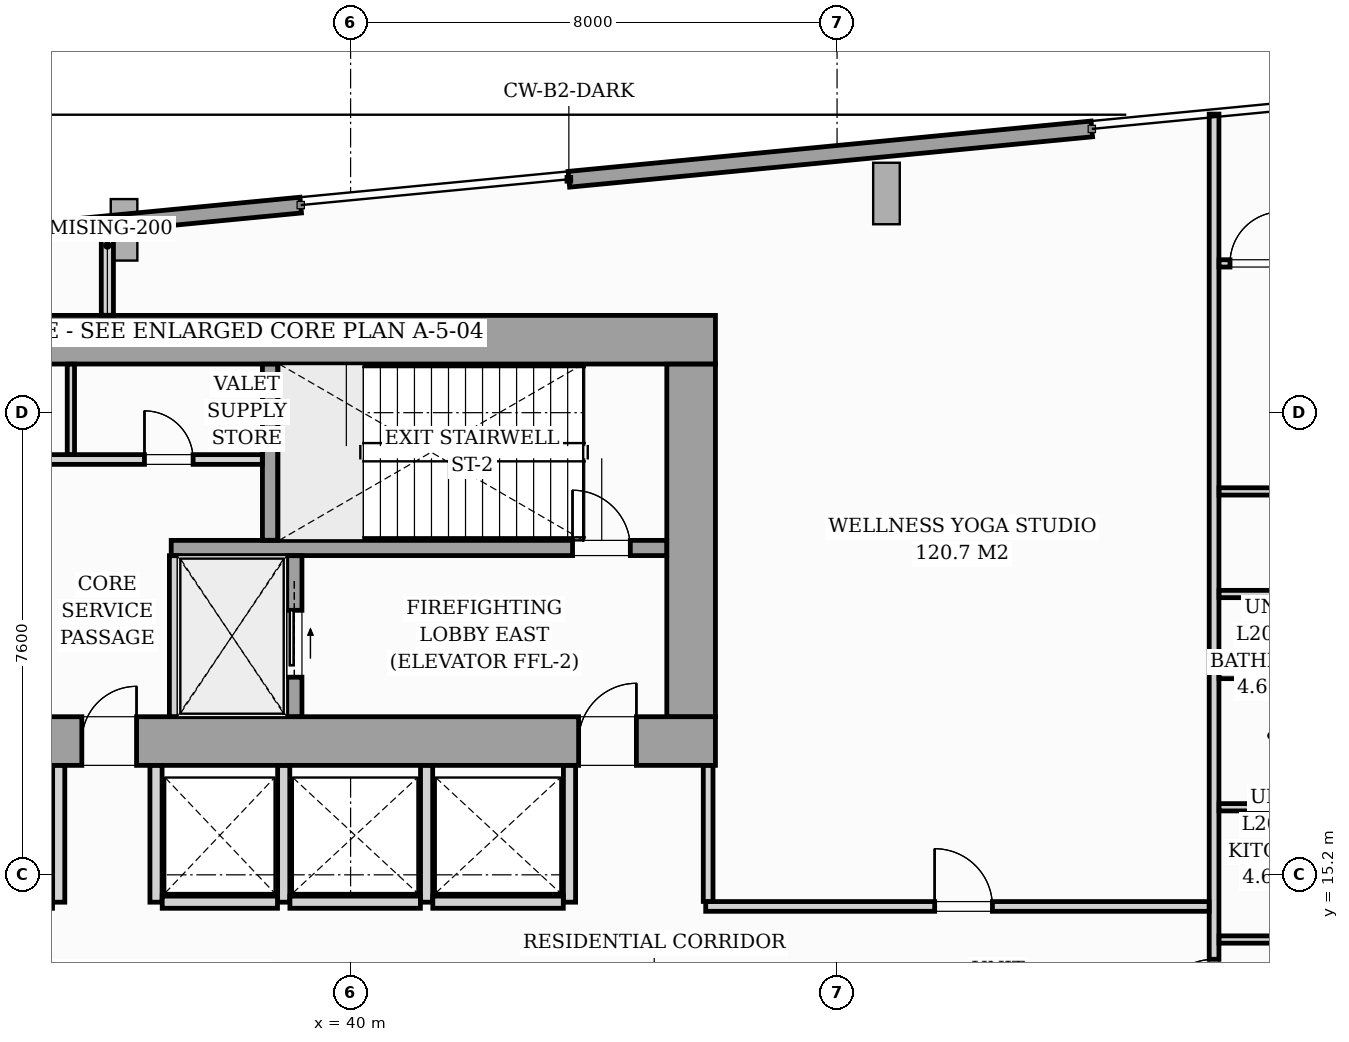
"""IFC4 building model, lengths in metres.
Left out: names, types, materials, properties, quantities, classifications, styles, units other than length and angle.
Written with IfcOpenShell. Run it as: python <this file> out.ifc"""

import sys

from ifc_helpers import new_model, si_unit, direction, frame, frame_2d, origin, origin_2d, place, context, subcontext, project, spatial, rectangle, i_section, extrude, source, transform, mapped, element, fill, save


model = new_model("IFC4")
c1 = context("Model", 3, precision=1e-05, world=origin(), true_north=direction((0.0, 1.0)))
c2 = subcontext(c1, "Body", "Model", "MODEL_VIEW")
j1 = project(units=[si_unit("LENGTHUNIT", "METRE"), si_unit("PLANEANGLEUNIT", "RADIAN")], contexts=[c1])
p1 = place(None, origin())
s1 = spatial("IfcSite", under=j1, at=p1, CompositionType="ELEMENT")
p2 = place(p1, origin())
s2 = spatial("IfcBuilding", under=s1, at=p2, CompositionType="ELEMENT")
p3 = place(p2, frame((0.0, 0.0, 72.6)))
s3 = spatial("IfcBuildingStorey", under=s2, at=p3, CompositionType="ELEMENT", Elevation=72.6)
m1 = source(origin(), c2, "Body", "SweptSolid", [
    extrude(i_section(OverallWidth=0.427, OverallDepth=0.483, WebThickness=0.051, FlangeThickness=0.082, FilletRadius=0.018, at=origin_2d()), origin(), (0.0, 0.0, 1.0), 5.196),
])
for number, where, z_axis, x_axis in (
    (1, (38.88, 17.4, 0.002), (0.0, 0.0, 1.0), (1.0, 0.0, 0.0)),
    (2, (45.6, 17.4, 0.002), (0.0, 0.0, 1.0), (1.0, 0.0, 0.0)),
    (3, (38.88, 24.0, 0.002), (0.0, 0.0, 1.0), (1.0, 0.0, 0.0)),
    (4, (45.6, 24.0, 0.002), (0.0, 0.0, 1.0), (1.0, 0.0, 0.0)),
):
    element("IfcColumn", number, at=place(p3, frame(where, z_axis=z_axis, x_axis=x_axis)), inside=s3, PredefinedType="PILASTER", context=c2, shape_type="MappedRepresentation", body=[
        mapped(m1, transform((0.0, 0.0, 0.0), scale=1.0)),
    ])
m2 = source(origin(), c2, "Body", "SweptSolid", [
    extrude(i_section(OverallWidth=0.438, OverallDepth=1.011, WebThickness=0.041, FlangeThickness=0.074, FilletRadius=0.024, at=origin_2d()), origin(), (0.0, 0.0, 1.0), 5.27),
])
p4 = place(p3, frame((35.649, 25.935, 0.124), z_axis=(0.499720902571, -0.102566244395, 0.860092544465), x_axis=(-0.84252926259, 0.172926651282, 0.510138035198)))
e5 = element("IfcColumn", 5, at=p4, inside=s3, PredefinedType="COLUMN", context=c2, shape_type="MappedRepresentation", body=[
    mapped(m2, transform((0.0, 0.0, 0.0), scale=1.0)),
])
m3 = source(origin(), c2, "Body", "SweptSolid", [
    extrude(i_section(OverallWidth=0.438, OverallDepth=1.011, WebThickness=0.041, FlangeThickness=0.074, FilletRadius=0.024, at=origin_2d()), origin(), (0.0, 0.0, 1.0), 5.549),
])
p5 = place(p3, frame((48.048, 26.425, 0.14), z_axis=(0.584868790237, -0.015707376673, 0.810975817472), x_axis=(-0.810683514332, 0.021771911127, 0.585079672759)))
e6 = element("IfcColumn", 6, at=p5, inside=s3, PredefinedType="COLUMN", context=c2, shape_type="MappedRepresentation", body=[
    mapped(m3, transform((0.0, 0.0, 0.0), scale=1.0)),
])
p6 = place(p3, frame((31.993, 25.522, 0.0), z_axis=(0.0, 0.0, 1.0), x_axis=(0.99539768453, 0.095830316879, 0.0)))
e7 = element("IfcWall", 7, at=p6, inside=s3, PredefinedType="STANDARD", context=c2, shape_type="SweptSolid", body=[
    extrude(rectangle(XDim=7.22, YDim=0.26, at=frame_2d((3.61, 0.0))), origin(), (0.0, 0.0, 1.0), 4.78),
])
p7 = place(p3, frame((43.589, 26.638, 0.0), z_axis=(0.0, 0.0, 1.0), x_axis=(0.995396129087, 0.09584647202, 0.0)))
e8 = element("IfcWall", 8, at=p7, inside=s3, PredefinedType="STANDARD", context=c2, shape_type="SweptSolid", body=[
    extrude(rectangle(XDim=8.64, YDim=0.26, at=frame_2d((4.32, 0.0))), origin(), (0.0, 0.0, 1.0), 4.78),
])
p8 = place(p3, frame((26.0, 17.4, 0.0), z_axis=(0.0, 0.0, 1.0), x_axis=(1.0, 0.0, 0.0)))
e9 = element("IfcWall", 9, at=p8, inside=s3, PredefinedType="SHEAR", context=c2, shape_type="SweptSolid", body=[
    extrude(rectangle(XDim=20.0, YDim=0.8, at=frame_2d((10.0, 0.0))), origin(), (0.0, 0.0, 1.0), 5.2),
])
p9 = place(p8, frame((1.15, 0.0, 0.0)))
e10 = element("IfcOpeningElement", 10, at=p9, cuts=e9, PredefinedType="OPENING", context=c2, shape_type="SweptSolid", body=[
    extrude(rectangle(XDim=0.95, YDim=2.06, at=frame_2d((0.475, 1.03))), frame((0.0, 0.41, 0.0), z_axis=(0.0, -1.0, 0.0), x_axis=(1.0, 0.0, 0.0)), (0.0, 0.0, 1.0), 0.82),
])
p10 = place(p8, frame((9.58, 0.0, 0.0)))
e11 = element("IfcOpeningElement", 11, at=p10, cuts=e9, PredefinedType="OPENING", context=c2, shape_type="SweptSolid", body=[
    extrude(rectangle(XDim=0.9, YDim=2.06, at=frame_2d((0.45, 1.03))), frame((0.0, 0.41, 0.0), z_axis=(0.0, -1.0, 0.0), x_axis=(1.0, 0.0, 0.0)), (0.0, 0.0, 1.0), 0.82),
])
p11 = place(p8, frame((17.75, 0.0, 0.0)))
e12 = element("IfcOpeningElement", 12, at=p11, cuts=e9, PredefinedType="OPENING", context=c2, shape_type="SweptSolid", body=[
    extrude(rectangle(XDim=0.95, YDim=2.06, at=frame_2d((0.475, 1.03))), frame((0.0, 0.41, 0.0), z_axis=(0.0, -1.0, 0.0), x_axis=(1.0, 0.0, 0.0)), (0.0, 0.0, 1.0), 0.82),
])
p12 = place(p3, frame((26.0, 24.0, 0.0), z_axis=(0.0, 0.0, 1.0), x_axis=(1.0, 0.0, 0.0)))
e13 = element("IfcWall", 13, at=p12, inside=s3, PredefinedType="SHEAR", context=c2, shape_type="SweptSolid", body=[
    extrude(rectangle(XDim=20.0, YDim=0.8, at=frame_2d((10.0, 0.0))), origin(), (0.0, 0.0, 1.0), 5.2),
])
p13 = place(p3, frame((45.6, 17.802, 0.0), z_axis=(0.0, 0.0, 1.0), x_axis=(0.0, 1.0, 0.0)))
e14 = element("IfcWall", 14, at=p13, inside=s3, PredefinedType="SHEAR", context=c2, shape_type="SweptSolid", body=[
    extrude(rectangle(XDim=5.796, YDim=0.8, at=frame_2d((2.898, 0.0))), origin(), (0.0, 0.0, 1.0), 5.2),
])
p14 = place(p3, frame((37.05, 20.575, 0.0), z_axis=(0.0, 0.0, 1.0), x_axis=(1.0, 0.0, 0.0)))
e15 = element("IfcWall", 15, at=p14, inside=s3, PredefinedType="SOLIDWALL", context=c2, shape_type="SweptSolid", body=[
    extrude(rectangle(XDim=8.148, YDim=0.25, at=frame_2d((4.074, 0.0))), origin(), (0.0, 0.0, 1.0), 5.2),
])
p15 = place(p14, frame((6.6, 0.0, 0.0)))
e16 = element("IfcOpeningElement", 16, at=p15, cuts=e15, PredefinedType="OPENING", context=c2, shape_type="SweptSolid", body=[
    extrude(rectangle(XDim=0.95, YDim=2.06, at=frame_2d((0.475, 1.03))), frame((0.0, 0.135, 0.0), z_axis=(0.0, -1.0, 0.0), x_axis=(1.0, 0.0, 0.0)), (0.0, 0.0, 1.0), 0.27),
])
p16 = place(p3, frame((38.675, 20.702, 0.0), z_axis=(0.0, 0.0, 1.0), x_axis=(0.0, 1.0, 0.0)))
e17 = element("IfcWall", 17, at=p16, inside=s3, PredefinedType="SOLIDWALL", context=c2, shape_type="SweptSolid", body=[
    extrude(rectangle(XDim=2.896, YDim=0.25, at=frame_2d((1.448, 0.0))), origin(), (0.0, 0.0, 1.0), 5.2),
])
p17 = place(p3, frame((37.1, 17.802, 0.0), z_axis=(0.0, 0.0, 1.0), x_axis=(0.0, 1.0, 0.0)))
e18 = element("IfcWall", 18, at=p17, inside=s3, PredefinedType="PARTITIONING", context=c2, shape_type="SweptSolid", body=[
    extrude(rectangle(XDim=2.646, YDim=0.16, at=frame_2d((1.323, 0.0))), origin(), (0.0, 0.0, 1.0), 4.78),
])
p18 = place(p3, frame((39.075, 17.802, 0.0), z_axis=(0.0, 0.0, 1.0), x_axis=(0.0, 1.0, 0.0)))
e19 = element("IfcWall", 19, at=p18, inside=s3, PredefinedType="SOLIDWALL", context=c2, shape_type="SweptSolid", body=[
    extrude(rectangle(XDim=2.646, YDim=0.25, at=frame_2d((1.323, 0.0))), origin(), (0.0, 0.0, 1.0), 5.2),
])
p19 = place(p18, frame((0.648, 0.0, 0.0)))
e20 = element("IfcOpeningElement", 20, at=p19, cuts=e19, PredefinedType="OPENING", context=c2, shape_type="SweptSolid", body=[
    extrude(rectangle(XDim=1.1, YDim=2.08, at=frame_2d((0.55, 1.04))), frame((0.0, 0.135, 0.0), z_axis=(0.0, -1.0, 0.0), x_axis=(1.0, 0.0, 0.0)), (0.0, 0.0, 1.0), 0.27),
])
p20 = place(p3, frame((33.452, 22.03, 0.0), z_axis=(0.0, 0.0, 1.0), x_axis=(1.0, 0.0, 0.0)))
e21 = element("IfcWall", 21, at=p20, inside=s3, PredefinedType="PARTITIONING", context=c2, shape_type="SweptSolid", body=[
    extrude(rectangle(XDim=5.096, YDim=0.16, at=frame_2d((2.548, 0.0))), origin(), (0.0, 0.0, 1.0), 4.78),
])
p21 = place(p20, frame((0.538, 0.0, 0.0)))
e22 = element("IfcOpeningElement", 22, at=p21, cuts=e21, PredefinedType="OPENING", context=c2, shape_type="SweptSolid", body=[
    extrude(rectangle(XDim=0.8, YDim=2.05, at=frame_2d((0.4, 1.025))), frame((0.0, 0.09, 0.0), z_axis=(0.0, -1.0, 0.0), x_axis=(1.0, 0.0, 0.0)), (0.0, 0.0, 1.0), 0.18),
])
p22 = place(p20, frame((3.158, 0.0, 0.0)))
e23 = element("IfcOpeningElement", 23, at=p22, cuts=e21, PredefinedType="OPENING", context=c2, shape_type="SweptSolid", body=[
    extrude(rectangle(XDim=0.8, YDim=2.05, at=frame_2d((0.4, 1.025))), frame((0.0, 0.09, 0.0), z_axis=(0.0, -1.0, 0.0), x_axis=(1.0, 0.0, 0.0)), (0.0, 0.0, 1.0), 0.18),
])
p23 = place(p3, frame((35.4, 22.112, 0.0), z_axis=(0.0, 0.0, 1.0), x_axis=(0.0, 1.0, 0.0)))
e24 = element("IfcWall", 24, at=p23, inside=s3, PredefinedType="PARTITIONING", context=c2, shape_type="SweptSolid", body=[
    extrude(rectangle(XDim=1.486, YDim=0.12, at=frame_2d((0.743, 0.0))), origin(), (0.0, 0.0, 1.0), 4.78),
])
for number, where, z_axis, x_axis in (
    (25, (35.2, 14.75, 0.0), (0.0, 0.0, 1.0), (0.0, 1.0, 0.0)),
    (26, (36.8, 14.75, 0.0), (0.0, 0.0, 1.0), (0.0, 1.0, 0.0)),
    (27, (38.9, 14.75, 0.0), (0.0, 0.0, 1.0), (0.0, 1.0, 0.0)),
):
    element("IfcWall", number, at=place(p3, frame(where, z_axis=z_axis, x_axis=x_axis)), inside=s3, PredefinedType="PARTITIONING", context=c2, shape_type="SweptSolid", body=[
        extrude(rectangle(XDim=2.248, YDim=0.2, at=frame_2d((1.124, 0.0))), origin(), (0.0, 0.0, 1.0), 4.78),
    ])
p24 = place(p3, frame((36.902, 14.75, 0.0), z_axis=(0.0, 0.0, 1.0), x_axis=(1.0, 0.0, 0.0)))
e28 = element("IfcWall", 28, at=p24, inside=s3, PredefinedType="PARTITIONING", context=c2, shape_type="SweptSolid", body=[
    extrude(rectangle(XDim=1.896, YDim=0.2, at=frame_2d((0.948, 0.0))), origin(), (0.0, 0.0, 1.0), 4.78),
])
for number, where, z_axis, x_axis in (
    (29, (41.25, 14.75, 0.0), (0.0, 0.0, 1.0), (0.0, 1.0, 0.0)),
    (30, (43.6, 14.75, 0.0), (0.0, 0.0, 1.0), (0.0, 1.0, 0.0)),
):
    element("IfcWall", number, at=place(p3, frame(where, z_axis=z_axis, x_axis=x_axis)), inside=s3, PredefinedType="PARTITIONING", context=c2, shape_type="SweptSolid", body=[
        extrude(rectangle(XDim=2.248, YDim=0.2, at=frame_2d((1.124, 0.0))), origin(), (0.0, 0.0, 1.0), 4.78),
    ])
for number, where, z_axis, x_axis in (
    (31, (39.002, 14.75, 0.0), (0.0, 0.0, 1.0), (1.0, 0.0, 0.0)),
    (32, (41.352, 14.75, 0.0), (0.0, 0.0, 1.0), (1.0, 0.0, 0.0)),
):
    element("IfcWall", number, at=place(p3, frame(where, z_axis=z_axis, x_axis=x_axis)), inside=s3, PredefinedType="PARTITIONING", context=c2, shape_type="SweptSolid", body=[
        extrude(rectangle(XDim=2.146, YDim=0.2, at=frame_2d((1.073, 0.0))), origin(), (0.0, 0.0, 1.0), 4.78),
    ])
p25 = place(p3, frame((54.2, 12.432, 0.0), z_axis=(0.0, 0.0, 1.0), x_axis=(0.0, 1.0, 0.0)))
e33 = element("IfcWall", 33, at=p25, inside=s3, PredefinedType="PARTITIONING", context=c2, shape_type="SweptSolid", body=[
    extrude(rectangle(XDim=15.278, YDim=0.16, at=frame_2d((7.639, 0.0))), origin(), (0.0, 0.0, 1.0), 4.78),
])
p26 = place(p25, frame((0.429, 0.0, 0.0)))
e34 = element("IfcOpeningElement", 34, at=p26, cuts=e33, PredefinedType="OPENING", context=c2, shape_type="SweptSolid", body=[
    extrude(rectangle(XDim=0.95, YDim=2.06, at=frame_2d((0.475, 1.03))), frame((0.0, 0.09, 0.0), z_axis=(0.0, -1.0, 0.0), x_axis=(1.0, 0.0, 0.0)), (0.0, 0.0, 1.0), 0.18),
])
p27 = place(p3, frame((36.0, 24.402, 0.0), z_axis=(0.0, 0.0, 1.0), x_axis=(0.0, 1.0, 0.0)))
e35 = element("IfcWall", 35, at=p27, inside=s3, PredefinedType="PARTITIONING", context=c2, shape_type="SweptSolid", body=[
    extrude(rectangle(XDim=1.373, YDim=0.2, at=frame_2d((0.687, 0.0))), origin(), (0.0, 0.0, 1.0), 4.78),
])
p28 = place(p3, frame((54.282, 16.311, 0.0), z_axis=(0.0, 0.0, 1.0), x_axis=(1.0, 0.0, 0.0)))
e36 = element("IfcWall", 36, at=p28, inside=s3, PredefinedType="PARTITIONING", context=c2, shape_type="SweptSolid", body=[
    extrude(rectangle(XDim=2.256, YDim=0.12, at=frame_2d((1.128, 0.0))), origin(), (0.0, 0.0, 1.0), 4.78),
])
p29 = place(p3, frame((54.282, 14.136, 0.0), z_axis=(0.0, 0.0, 1.0), x_axis=(1.0, 0.0, 0.0)))
e37 = element("IfcWall", 37, at=p29, inside=s3, PredefinedType="PARTITIONING", context=c2, shape_type="SweptSolid", body=[
    extrude(rectangle(XDim=2.256, YDim=0.12, at=frame_2d((1.128, 0.0))), origin(), (0.0, 0.0, 1.0), 4.78),
])
p30 = place(p29, frame((1.226, 0.0, 0.0)))
e38 = element("IfcOpeningElement", 38, at=p30, cuts=e37, PredefinedType="OPENING", context=c2, shape_type="SweptSolid", body=[
    extrude(rectangle(XDim=0.85, YDim=2.05, at=frame_2d((0.425, 1.025))), frame((0.0, 0.07, 0.0), z_axis=(0.0, -1.0, 0.0), x_axis=(1.0, 0.0, 0.0)), (0.0, 0.0, 1.0), 0.14),
])
p31 = place(p3, frame((54.282, 18.486, 0.0), z_axis=(0.0, 0.0, 1.0), x_axis=(1.0, 0.0, 0.0)))
e39 = element("IfcWall", 39, at=p31, inside=s3, PredefinedType="PARTITIONING", context=c2, shape_type="SweptSolid", body=[
    extrude(rectangle(XDim=2.256, YDim=0.12, at=frame_2d((1.128, 0.0))), origin(), (0.0, 0.0, 1.0), 4.78),
])
p32 = place(p3, frame((54.282, 25.255, 0.0), z_axis=(0.0, 0.0, 1.0), x_axis=(1.0, 0.0, 0.0)))
e40 = element("IfcWall", 40, at=p32, inside=s3, PredefinedType="PARTITIONING", context=c2, shape_type="SweptSolid", body=[
    extrude(rectangle(XDim=6.901, YDim=0.12, at=frame_2d((3.451, 0.0))), origin(), (0.0, 0.0, 1.0), 4.78),
])
p33 = place(p32, frame((0.18, 0.0, 0.0)))
e41 = element("IfcOpeningElement", 41, at=p33, cuts=e40, PredefinedType="OPENING", context=c2, shape_type="SweptSolid", body=[
    extrude(rectangle(XDim=0.85, YDim=2.05, at=frame_2d((0.425, 1.025))), frame((0.0, 0.07, 0.0), z_axis=(0.0, -1.0, 0.0), x_axis=(1.0, 0.0, 0.0)), (0.0, 0.0, 1.0), 0.14),
])
p34 = place(p3, frame((54.282, 21.505, 0.0), z_axis=(0.0, 0.0, 1.0), x_axis=(1.0, 0.0, 0.0)))
e42 = element("IfcWall", 42, at=p34, inside=s3, PredefinedType="PARTITIONING", context=c2, shape_type="SweptSolid", body=[
    extrude(rectangle(XDim=14.274, YDim=0.12, at=frame_2d((7.137, 0.0))), origin(), (0.0, 0.0, 1.0), 4.78),
])
p35 = place(p34, frame((4.853, 0.0, 0.0)))
e43 = element("IfcOpeningElement", 43, at=p35, cuts=e42, PredefinedType="OPENING", context=c2, shape_type="SweptSolid", body=[
    extrude(rectangle(XDim=0.85, YDim=2.05, at=frame_2d((0.425, 1.025))), frame((0.0, 0.07, 0.0), z_axis=(0.0, -1.0, 0.0), x_axis=(1.0, 0.0, 0.0)), (0.0, 0.0, 1.0), 0.14),
])
p36 = place(p3, frame((54.282, 19.818, 0.0), z_axis=(0.0, 0.0, 1.0), x_axis=(1.0, 0.0, 0.0)))
e44 = element("IfcWall", 44, at=p36, inside=s3, PredefinedType="PARTITIONING", context=c2, shape_type="SweptSolid", body=[
    extrude(rectangle(XDim=14.254, YDim=0.12, at=frame_2d((7.127, 0.0))), origin(), (0.0, 0.0, 1.0), 4.78),
])
p37 = place(p36, frame((4.853, 0.0, 0.0)))
e45 = element("IfcOpeningElement", 45, at=p37, cuts=e44, PredefinedType="OPENING", context=c2, shape_type="SweptSolid", body=[
    extrude(rectangle(XDim=0.85, YDim=2.05, at=frame_2d((0.425, 1.025))), frame((0.0, 0.07, 0.0), z_axis=(0.0, -1.0, 0.0), x_axis=(1.0, 0.0, 0.0)), (0.0, 0.0, 1.0), 0.14),
])
p38 = place(p3, frame((45.84, 14.68, 0.0), z_axis=(0.0, 0.0, 1.0), x_axis=(1.0, 0.0, 0.0)))
e46 = element("IfcWall", 46, at=p38, inside=s3, PredefinedType="PARTITIONING", context=c2, shape_type="SweptSolid", body=[
    extrude(rectangle(XDim=8.278, YDim=0.16, at=frame_2d((4.139, 0.0))), origin(), (0.0, 0.0, 1.0), 4.78),
])
p39 = place(p38, frame((3.765, 0.0, 0.0)))
e47 = element("IfcOpeningElement", 47, at=p39, cuts=e46, PredefinedType="OPENING", context=c2, shape_type="SweptSolid", body=[
    extrude(rectangle(XDim=0.95, YDim=2.06, at=frame_2d((0.475, 1.03))), frame((0.0, 0.09, 0.0), z_axis=(0.0, -1.0, 0.0), x_axis=(1.0, 0.0, 0.0)), (0.0, 0.0, 1.0), 0.18),
])
p40 = place(p3, frame((45.88, 14.762, 0.0), z_axis=(0.0, 0.0, 1.0), x_axis=(0.0, 1.0, 0.0)))
e48 = element("IfcWall", 48, at=p40, inside=s3, PredefinedType="PARTITIONING", context=c2, shape_type="SweptSolid", body=[
    extrude(rectangle(XDim=2.236, YDim=0.16, at=frame_2d((1.118, 0.0))), origin(), (0.0, 0.0, 1.0), 4.78),
])
m4 = source(origin(), c2, "Body", "SweptSolid", [
    extrude(rectangle(XDim=0.9, YDim=2.06, at=frame_2d((0.45, 1.03))), frame((0.0, 0.025, 0.0), z_axis=(0.0, -1.0, 0.0), x_axis=(1.0, 0.0, 0.0)), (0.0, 0.0, 1.0), 0.05),
])
p41 = place(p10, origin())
e49 = element("IfcDoor", 49, at=p41, inside=s3, OperationType="SINGLE_SWING_RIGHT", PredefinedType="DOOR", context=c2, shape_type="MappedRepresentation", body=[
    mapped(m4, transform((0.0, 0.0, 0.0), scale=1.0)),
])
fill(e11, e49)
m5 = source(origin(), c2, "Body", "SweptSolid", [
    extrude(rectangle(XDim=0.95, YDim=2.06, at=frame_2d((0.475, 1.03))), frame((0.0, 0.025, 0.0), z_axis=(0.0, -1.0, 0.0), x_axis=(1.0, 0.0, 0.0)), (0.0, 0.0, 1.0), 0.05),
])
p42 = place(p11, origin())
e50 = element("IfcDoor", 50, at=p42, inside=s3, OperationType="SINGLE_SWING_RIGHT", PredefinedType="DOOR", context=c2, shape_type="MappedRepresentation", body=[
    mapped(m5, transform((0.0, 0.0, 0.0), scale=1.0)),
])
fill(e12, e50)
p43 = place(p15, origin())
e51 = element("IfcDoor", 51, at=p43, inside=s3, OperationType="SINGLE_SWING_LEFT", PredefinedType="DOOR", context=c2, shape_type="MappedRepresentation", body=[
    mapped(m5, transform((0.0, 0.0, 0.0), scale=1.0)),
])
fill(e16, e51)
m6 = source(origin(), c2, "Body", "SweptSolid", [
    extrude(rectangle(XDim=1.1, YDim=2.08, at=frame_2d((0.55, 1.04))), frame((0.0, 0.025, 0.0), z_axis=(0.0, -1.0, 0.0), x_axis=(1.0, 0.0, 0.0)), (0.0, 0.0, 1.0), 0.05),
])
p44 = place(p19, origin())
e52 = element("IfcDoor", 52, at=p44, inside=s3, OperationType="SLIDING_TO_RIGHT", PredefinedType="DOOR", context=c2, shape_type="MappedRepresentation", body=[
    mapped(m6, transform((0.0, 0.0, 0.0), scale=1.0)),
])
fill(e20, e52)
m7 = source(origin(), c2, "Body", "SweptSolid", [
    extrude(rectangle(XDim=0.8, YDim=2.05, at=frame_2d((0.4, 1.025))), frame((0.0, 0.025, 0.0), z_axis=(0.0, -1.0, 0.0), x_axis=(1.0, 0.0, 0.0)), (0.0, 0.0, 1.0), 0.05),
])
p45 = place(p22, origin())
e53 = element("IfcDoor", 53, at=p45, inside=s3, OperationType="SINGLE_SWING_LEFT", PredefinedType="DOOR", context=c2, shape_type="MappedRepresentation", body=[
    mapped(m7, transform((0.0, 0.0, 0.0), scale=1.0)),
])
fill(e23, e53)
m8 = source(origin(), c2, "Body", "SweptSolid", [
    extrude(rectangle(XDim=0.95, YDim=2.06, at=frame_2d((0.475, 1.03))), frame((0.0, 0.025, 0.0), z_axis=(0.0, -1.0, 0.0), x_axis=(1.0, 0.0, 0.0)), (0.0, 0.0, 1.0), 0.05),
])
p46 = place(p26, origin())
e54 = element("IfcDoor", 54, at=p46, inside=s3, OperationType="SINGLE_SWING_LEFT", PredefinedType="DOOR", context=c2, shape_type="MappedRepresentation", body=[
    mapped(m8, transform((0.0, 0.0, 0.0), scale=1.0)),
])
fill(e34, e54)
m9 = source(origin(), c2, "Body", "SweptSolid", [
    extrude(rectangle(XDim=0.85, YDim=2.05, at=frame_2d((0.425, 1.025))), frame((0.0, 0.025, 0.0), z_axis=(0.0, -1.0, 0.0), x_axis=(1.0, 0.0, 0.0)), (0.0, 0.0, 1.0), 0.05),
])
p47 = place(p33, origin())
e55 = element("IfcDoor", 55, at=p47, inside=s3, OperationType="SINGLE_SWING_RIGHT", PredefinedType="DOOR", context=c2, shape_type="MappedRepresentation", body=[
    mapped(m9, transform((0.0, 0.0, 0.0), scale=1.0)),
])
fill(e41, e55)
p48 = place(p39, origin())
e56 = element("IfcDoor", 56, at=p48, inside=s3, OperationType="SINGLE_SWING_LEFT", PredefinedType="DOOR", context=c2, shape_type="MappedRepresentation", body=[
    mapped(m8, transform((0.0, 0.0, 0.0), scale=1.0)),
])
fill(e47, e56)
save(model, sys.argv[1])
